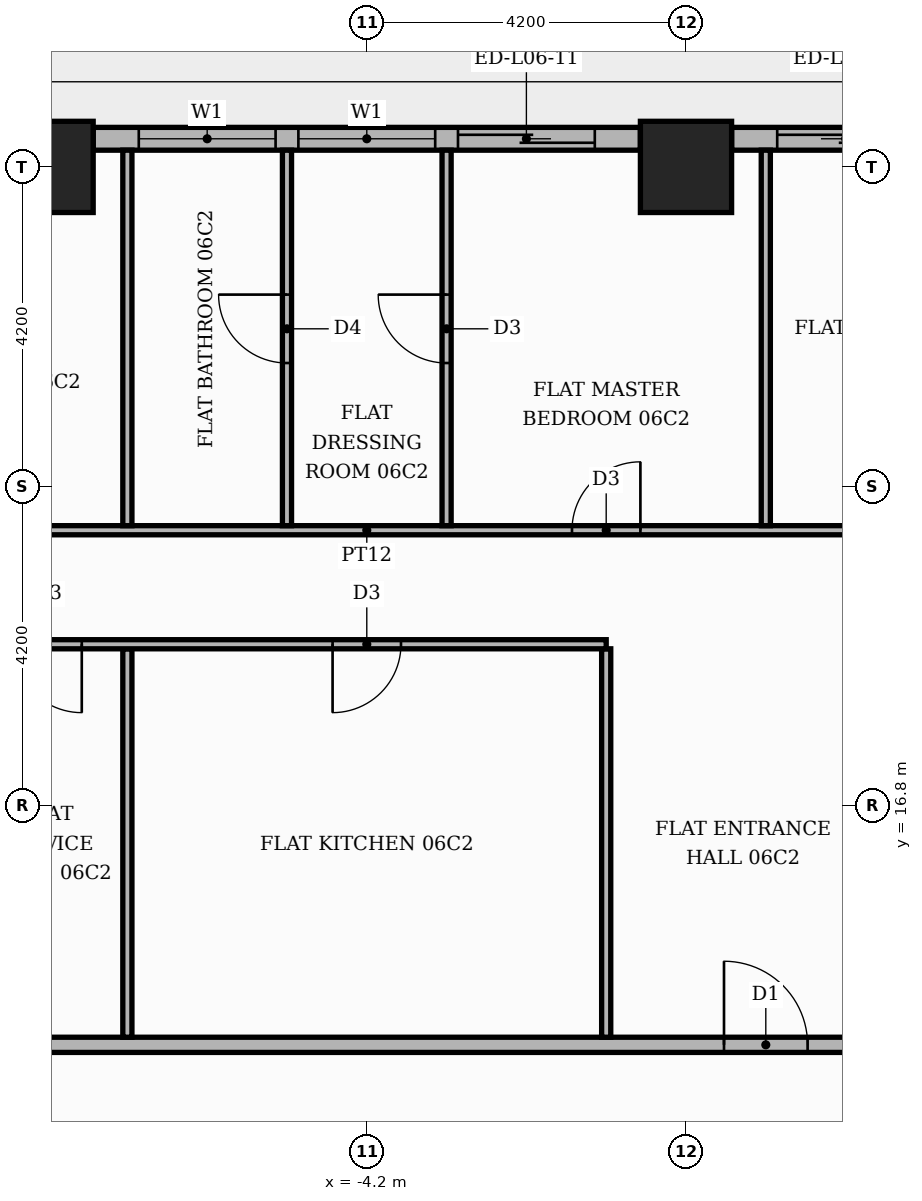
"""IFC4 building model, lengths in metres.
Left out: names, types, materials, properties, quantities, classifications, styles, units other than length and angle.
Written with IfcOpenShell. Run it as: python <this file> out.ifc"""

import sys

from ifc_helpers import new_model, si_unit, direction, frame, frame_2d, origin, origin_2d, place, context, subcontext, project, spatial, rectangle, extrude, element, fill, save


model = new_model("IFC4")
c1 = context("Model", 3, precision=1e-05, world=origin(), true_north=direction((0.0, 1.0)))
c2 = subcontext(c1, "Body", "Model", "MODEL_VIEW")
j1 = project(units=[si_unit("LENGTHUNIT", "METRE"), si_unit("PLANEANGLEUNIT", "RADIAN")], contexts=[c1])
p1 = place(None, origin())
s1 = spatial("IfcSite", under=j1, at=p1, CompositionType="ELEMENT")
p2 = place(p1, origin())
s2 = spatial("IfcBuilding", under=s1, at=p2, CompositionType="ELEMENT")
p3 = place(p2, frame((0.0, 0.0, 30.9)))
s3 = spatial("IfcBuildingStorey", under=s2, at=p3, CompositionType="ELEMENT", Elevation=30.9)
for number, where, z_axis, x_axis in (
    (1, (0.0, 25.2, 0.0), (0.0, 0.0, 1.0), (1.0, 0.0, 0.0)),
    (2, (-8.4, 25.2, 0.0), (0.0, 0.0, 1.0), (1.0, 0.0, 0.0)),
):
    element("IfcColumn", number, at=place(p3, frame(where, z_axis=z_axis, x_axis=x_axis)), inside=s3, PredefinedType="COLUMN", context=c2, shape_type="SweptSolid", body=[
        extrude(rectangle(XDim=1.2, YDim=1.2, at=origin_2d()), origin(), (0.0, 0.0, 1.0), 3.9),
    ])
p4 = place(p3, frame((7.8, 25.57, 0.0), z_axis=(0.0, 0.0, 1.0), x_axis=(-1.0, 0.0, 0.0)))
e3 = element("IfcWall", 3, at=p4, inside=s3, PredefinedType="STANDARD", context=c2, shape_type="SweptSolid", body=[
    extrude(rectangle(XDim=7.2, YDim=0.3, at=frame_2d((3.6, 0.0))), origin(), (0.0, 0.0, 1.0), 3.48),
])
p5 = place(p4, frame((0.6, 0.0, 0.9)))
e4 = element("IfcOpeningElement", 4, at=p5, cuts=e3, PredefinedType="OPENING", context=c2, shape_type="SweptSolid", body=[
    extrude(rectangle(XDim=1.8, YDim=2.1, at=frame_2d((0.9, 1.05))), frame((0.0, 0.16, 0.0), z_axis=(0.0, -1.0, 0.0), x_axis=(1.0, 0.0, 0.0)), (0.0, 0.0, 1.0), 0.32),
])
p6 = place(p4, frame((2.7, 0.0, 0.9)))
e5 = element("IfcOpeningElement", 5, at=p6, cuts=e3, PredefinedType="OPENING", context=c2, shape_type="SweptSolid", body=[
    extrude(rectangle(XDim=1.8, YDim=2.1, at=frame_2d((0.9, 1.05))), frame((0.0, 0.16, 0.0), z_axis=(0.0, -1.0, 0.0), x_axis=(1.0, 0.0, 0.0)), (0.0, 0.0, 1.0), 0.32),
])
p7 = place(p4, frame((4.8, 0.0, 0.0)))
e6 = element("IfcOpeningElement", 6, at=p7, cuts=e3, PredefinedType="OPENING", context=c2, shape_type="SweptSolid", body=[
    extrude(rectangle(XDim=1.8, YDim=2.4, at=frame_2d((0.9, 1.2))), frame((0.0, 0.16, 0.0), z_axis=(0.0, -1.0, 0.0), x_axis=(1.0, 0.0, 0.0)), (0.0, 0.0, 1.0), 0.32),
])
p8 = place(p3, frame((-0.6, 25.57, 0.0), z_axis=(0.0, 0.0, 1.0), x_axis=(-1.0, 0.0, 0.0)))
e7 = element("IfcWall", 7, at=p8, inside=s3, PredefinedType="STANDARD", context=c2, shape_type="SweptSolid", body=[
    extrude(rectangle(XDim=7.2, YDim=0.3, at=frame_2d((3.6, 0.0))), origin(), (0.0, 0.0, 1.0), 3.48),
])
p9 = place(p8, frame((0.6, 0.0, 0.0)))
e8 = element("IfcOpeningElement", 8, at=p9, cuts=e7, PredefinedType="OPENING", context=c2, shape_type="SweptSolid", body=[
    extrude(rectangle(XDim=1.8, YDim=2.4, at=frame_2d((0.9, 1.2))), frame((0.0, 0.16, 0.0), z_axis=(0.0, -1.0, 0.0), x_axis=(1.0, 0.0, 0.0)), (0.0, 0.0, 1.0), 0.32),
])
p10 = place(p8, frame((2.7, 0.0, 0.9)))
e9 = element("IfcOpeningElement", 9, at=p10, cuts=e7, PredefinedType="OPENING", context=c2, shape_type="SweptSolid", body=[
    extrude(rectangle(XDim=1.8, YDim=2.1, at=frame_2d((0.9, 1.05))), frame((0.0, 0.16, 0.0), z_axis=(0.0, -1.0, 0.0), x_axis=(1.0, 0.0, 0.0)), (0.0, 0.0, 1.0), 0.32),
])
p11 = place(p8, frame((4.8, 0.0, 0.9)))
e10 = element("IfcOpeningElement", 10, at=p11, cuts=e7, PredefinedType="OPENING", context=c2, shape_type="SweptSolid", body=[
    extrude(rectangle(XDim=1.8, YDim=2.1, at=frame_2d((0.9, 1.05))), frame((0.0, 0.16, 0.0), z_axis=(0.0, -1.0, 0.0), x_axis=(1.0, 0.0, 0.0)), (0.0, 0.0, 1.0), 0.32),
])
p12 = place(p3, frame((-13.65, 13.65, 0.0), z_axis=(0.0, 0.0, 1.0), x_axis=(1.0, 0.0, 0.0)))
e11 = element("IfcWall", 11, at=p12, inside=s3, PredefinedType="PARTITIONING", context=c2, shape_type="SweptSolid", body=[
    extrude(rectangle(XDim=39.07, YDim=0.2, at=frame_2d((19.535, 0.0))), origin(), (0.0, 0.0, 1.0), 3.48),
])
p13 = place(p12, frame((24.65, 0.0, 0.0)))
e12 = element("IfcOpeningElement", 12, at=p13, cuts=e11, PredefinedType="OPENING", context=c2, shape_type="SweptSolid", body=[
    extrude(rectangle(XDim=1.1, YDim=2.4, at=frame_2d((0.55, 1.2))), frame((0.0, 0.11, 0.0), z_axis=(0.0, -1.0, 0.0), x_axis=(1.0, 0.0, 0.0)), (0.0, 0.0, 1.0), 0.22),
])
p14 = place(p12, frame((14.15, 0.0, 0.0)))
e13 = element("IfcOpeningElement", 13, at=p14, cuts=e11, PredefinedType="OPENING", context=c2, shape_type="SweptSolid", body=[
    extrude(rectangle(XDim=1.1, YDim=2.4, at=frame_2d((0.55, 1.2))), frame((0.0, 0.11, 0.0), z_axis=(0.0, -1.0, 0.0), x_axis=(1.0, 0.0, 0.0)), (0.0, 0.0, 1.0), 0.22),
])
for number, where, z_axis, x_axis in (
    (14, (-7.35, 13.75, 0.0), (0.0, 0.0, 1.0), (0.0, 1.0, 0.0)),
    (15, (-1.05, 13.75, 0.0), (0.0, 0.0, 1.0), (0.0, 1.0, 0.0)),
):
    element("IfcWall", number, at=place(p3, frame(where, z_axis=z_axis, x_axis=x_axis)), inside=s3, PredefinedType="PARTITIONING", context=c2, shape_type="SweptSolid", body=[
        extrude(rectangle(XDim=5.11, YDim=0.12, at=frame_2d((2.555, 0.0))), origin(), (0.0, 0.0, 1.0), 3.48),
    ])
p15 = place(p3, frame((-13.55, 18.92, 0.0), z_axis=(0.0, 0.0, 1.0), x_axis=(1.0, 0.0, 0.0)))
e16 = element("IfcWall", 16, at=p15, inside=s3, PredefinedType="PARTITIONING", context=c2, shape_type="SweptSolid", body=[
    extrude(rectangle(XDim=12.5, YDim=0.12, at=frame_2d((6.25, 0.0))), origin(), (0.0, 0.0, 1.0), 3.48),
])
p16 = place(p15, frame((8.9, 0.0, 0.0)))
e17 = element("IfcOpeningElement", 17, at=p16, cuts=e16, PredefinedType="OPENING", context=c2, shape_type="SweptSolid", body=[
    extrude(rectangle(XDim=0.9, YDim=2.1, at=frame_2d((0.45, 1.05))), frame((0.0, 0.07, 0.0), z_axis=(0.0, -1.0, 0.0), x_axis=(1.0, 0.0, 0.0)), (0.0, 0.0, 1.0), 0.14),
])
p17 = place(p15, frame((4.7, 0.0, 0.0)))
e18 = element("IfcOpeningElement", 18, at=p17, cuts=e16, PredefinedType="OPENING", context=c2, shape_type="SweptSolid", body=[
    extrude(rectangle(XDim=0.9, YDim=2.1, at=frame_2d((0.45, 1.05))), frame((0.0, 0.07, 0.0), z_axis=(0.0, -1.0, 0.0), x_axis=(1.0, 0.0, 0.0)), (0.0, 0.0, 1.0), 0.14),
])
p18 = place(p15, frame((2.6, 0.0, 0.0)))
e19 = element("IfcOpeningElement", 19, at=p18, cuts=e16, PredefinedType="OPENING", context=c2, shape_type="SweptSolid", body=[
    extrude(rectangle(XDim=0.9, YDim=2.1, at=frame_2d((0.45, 1.05))), frame((0.0, 0.07, 0.0), z_axis=(0.0, -1.0, 0.0), x_axis=(1.0, 0.0, 0.0)), (0.0, 0.0, 1.0), 0.14),
])
p19 = place(p15, frame((0.5, 0.0, 0.0)))
e20 = element("IfcOpeningElement", 20, at=p19, cuts=e16, PredefinedType="OPENING", context=c2, shape_type="SweptSolid", body=[
    extrude(rectangle(XDim=0.9, YDim=2.1, at=frame_2d((0.45, 1.05))), frame((0.0, 0.07, 0.0), z_axis=(0.0, -1.0, 0.0), x_axis=(1.0, 0.0, 0.0)), (0.0, 0.0, 1.0), 0.14),
])
p20 = place(p3, frame((-13.55, 20.42, 0.0), z_axis=(0.0, 0.0, 1.0), x_axis=(1.0, 0.0, 0.0)))
e21 = element("IfcWall", 21, at=p20, inside=s3, PredefinedType="PARTITIONING", context=c2, shape_type="SweptSolid", body=[
    extrude(rectangle(XDim=18.7, YDim=0.12, at=frame_2d((9.35, 0.0))), origin(), (0.0, 0.0, 1.0), 3.48),
])
p21 = place(p20, frame((16.2, 0.0, 0.0)))
e22 = element("IfcOpeningElement", 22, at=p21, cuts=e21, PredefinedType="OPENING", context=c2, shape_type="SweptSolid", body=[
    extrude(rectangle(XDim=1.0, YDim=2.1, at=frame_2d((0.5, 1.05))), frame((0.0, 0.07, 0.0), z_axis=(0.0, -1.0, 0.0), x_axis=(1.0, 0.0, 0.0)), (0.0, 0.0, 1.0), 0.14),
])
p22 = place(p20, frame((12.05, 0.0, 0.0)))
e23 = element("IfcOpeningElement", 23, at=p22, cuts=e21, PredefinedType="OPENING", context=c2, shape_type="SweptSolid", body=[
    extrude(rectangle(XDim=0.9, YDim=2.1, at=frame_2d((0.45, 1.05))), frame((0.0, 0.07, 0.0), z_axis=(0.0, -1.0, 0.0), x_axis=(1.0, 0.0, 0.0)), (0.0, 0.0, 1.0), 0.14),
])
p23 = place(p20, frame((3.65, 0.0, 0.0)))
e24 = element("IfcOpeningElement", 24, at=p23, cuts=e21, PredefinedType="OPENING", context=c2, shape_type="SweptSolid", body=[
    extrude(rectangle(XDim=0.9, YDim=2.1, at=frame_2d((0.45, 1.05))), frame((0.0, 0.07, 0.0), z_axis=(0.0, -1.0, 0.0), x_axis=(1.0, 0.0, 0.0)), (0.0, 0.0, 1.0), 0.14),
])
p24 = place(p3, frame((-7.35, 20.48, 0.0), z_axis=(0.0, 0.0, 1.0), x_axis=(0.0, 1.0, 0.0)))
e25 = element("IfcWall", 25, at=p24, inside=s3, PredefinedType="PARTITIONING", context=c2, shape_type="SweptSolid", body=[
    extrude(rectangle(XDim=4.94, YDim=0.12, at=frame_2d((2.47, 0.0))), origin(), (0.0, 0.0, 1.0), 3.48),
])
p25 = place(p3, frame((-5.25, 20.48, 0.0), z_axis=(0.0, 0.0, 1.0), x_axis=(0.0, 1.0, 0.0)))
e26 = element("IfcWall", 26, at=p25, inside=s3, PredefinedType="PARTITIONING", context=c2, shape_type="SweptSolid", body=[
    extrude(rectangle(XDim=4.94, YDim=0.12, at=frame_2d((2.47, 0.0))), origin(), (0.0, 0.0, 1.0), 3.48),
])
p26 = place(p25, frame((2.14, 0.0, 0.0)))
e27 = element("IfcOpeningElement", 27, at=p26, cuts=e26, PredefinedType="OPENING", context=c2, shape_type="SweptSolid", body=[
    extrude(rectangle(XDim=0.9, YDim=2.1, at=frame_2d((0.45, 1.05))), frame((0.0, 0.07, 0.0), z_axis=(0.0, -1.0, 0.0), x_axis=(1.0, 0.0, 0.0)), (0.0, 0.0, 1.0), 0.14),
])
p27 = place(p3, frame((-3.15, 20.48, 0.0), z_axis=(0.0, 0.0, 1.0), x_axis=(0.0, 1.0, 0.0)))
e28 = element("IfcWall", 28, at=p27, inside=s3, PredefinedType="PARTITIONING", context=c2, shape_type="SweptSolid", body=[
    extrude(rectangle(XDim=4.94, YDim=0.12, at=frame_2d((2.47, 0.0))), origin(), (0.0, 0.0, 1.0), 3.48),
])
p28 = place(p27, frame((2.14, 0.0, 0.0)))
e29 = element("IfcOpeningElement", 29, at=p28, cuts=e28, PredefinedType="OPENING", context=c2, shape_type="SweptSolid", body=[
    extrude(rectangle(XDim=0.9, YDim=2.1, at=frame_2d((0.45, 1.05))), frame((0.0, 0.07, 0.0), z_axis=(0.0, -1.0, 0.0), x_axis=(1.0, 0.0, 0.0)), (0.0, 0.0, 1.0), 0.14),
])
p29 = place(p3, frame((1.05, 20.48, 0.0), z_axis=(0.0, 0.0, 1.0), x_axis=(0.0, 1.0, 0.0)))
e30 = element("IfcWall", 30, at=p29, inside=s3, PredefinedType="PARTITIONING", context=c2, shape_type="SweptSolid", body=[
    extrude(rectangle(XDim=4.94, YDim=0.12, at=frame_2d((2.47, 0.0))), origin(), (0.0, 0.0, 1.0), 3.48),
])
p30 = place(p7, origin())
e31 = element("IfcDoor", 31, at=p30, inside=s3, OperationType="SLIDING_TO_RIGHT", PredefinedType="DOOR", context=c2, shape_type="SweptSolid", body=[
    extrude(rectangle(XDim=1.8, YDim=2.4, at=frame_2d((0.9, 1.2))), frame((0.0, 0.025, 0.0), z_axis=(0.0, -1.0, 0.0), x_axis=(1.0, 0.0, 0.0)), (0.0, 0.0, 1.0), 0.05),
])
fill(e6, e31)
p31 = place(p9, origin())
e32 = element("IfcDoor", 32, at=p31, inside=s3, OperationType="SLIDING_TO_LEFT", PredefinedType="DOOR", context=c2, shape_type="SweptSolid", body=[
    extrude(rectangle(XDim=1.8, YDim=2.4, at=frame_2d((0.9, 1.2))), frame((0.0, 0.025, 0.0), z_axis=(0.0, -1.0, 0.0), x_axis=(1.0, 0.0, 0.0)), (0.0, 0.0, 1.0), 0.05),
])
fill(e8, e32)
p32 = place(p10, origin())
e33 = element("IfcWindow", 33, at=p32, inside=s3, PartitioningType="SINGLE_PANEL", PredefinedType="WINDOW", context=c2, shape_type="SweptSolid", body=[
    extrude(rectangle(XDim=1.8, YDim=2.1, at=frame_2d((0.9, 1.05))), frame((0.0, 0.03, 0.0), z_axis=(0.0, -1.0, 0.0), x_axis=(1.0, 0.0, 0.0)), (0.0, 0.0, 1.0), 0.06),
])
fill(e9, e33)
p33 = place(p11, origin())
e34 = element("IfcWindow", 34, at=p33, inside=s3, PartitioningType="SINGLE_PANEL", PredefinedType="WINDOW", context=c2, shape_type="SweptSolid", body=[
    extrude(rectangle(XDim=1.8, YDim=2.1, at=frame_2d((0.9, 1.05))), frame((0.0, 0.03, 0.0), z_axis=(0.0, -1.0, 0.0), x_axis=(1.0, 0.0, 0.0)), (0.0, 0.0, 1.0), 0.06),
])
fill(e10, e34)
p34 = place(p14, origin())
e35 = element("IfcDoor", 35, at=p34, inside=s3, OperationType="SINGLE_SWING_LEFT", PredefinedType="DOOR", context=c2, shape_type="SweptSolid", body=[
    extrude(rectangle(XDim=1.1, YDim=2.4, at=frame_2d((0.55, 1.2))), frame((0.0, 0.025, 0.0), z_axis=(0.0, -1.0, 0.0), x_axis=(1.0, 0.0, 0.0)), (0.0, 0.0, 1.0), 0.05),
])
fill(e13, e35)
p35 = place(p16, frame((0.9, 0.0, 0.0), z_axis=(0.0, 0.0, 1.0), x_axis=(-1.0, 0.0, 0.0)))
e36 = element("IfcDoor", 36, at=p35, inside=s3, OperationType="SINGLE_SWING_LEFT", PredefinedType="DOOR", context=c2, shape_type="SweptSolid", body=[
    extrude(rectangle(XDim=0.9, YDim=2.1, at=frame_2d((0.45, 1.05))), frame((0.0, 0.025, 0.0), z_axis=(0.0, -1.0, 0.0), x_axis=(1.0, 0.0, 0.0)), (0.0, 0.0, 1.0), 0.05),
])
fill(e17, e36)
p36 = place(p17, frame((0.9, 0.0, 0.0), z_axis=(0.0, 0.0, 1.0), x_axis=(-1.0, 0.0, 0.0)))
e37 = element("IfcDoor", 37, at=p36, inside=s3, OperationType="SINGLE_SWING_RIGHT", PredefinedType="DOOR", context=c2, shape_type="SweptSolid", body=[
    extrude(rectangle(XDim=0.9, YDim=2.1, at=frame_2d((0.45, 1.05))), frame((0.0, 0.025, 0.0), z_axis=(0.0, -1.0, 0.0), x_axis=(1.0, 0.0, 0.0)), (0.0, 0.0, 1.0), 0.05),
])
fill(e18, e37)
p37 = place(p22, origin())
e38 = element("IfcDoor", 38, at=p37, inside=s3, OperationType="SINGLE_SWING_RIGHT", PredefinedType="DOOR", context=c2, shape_type="SweptSolid", body=[
    extrude(rectangle(XDim=0.9, YDim=2.1, at=frame_2d((0.45, 1.05))), frame((0.0, 0.025, 0.0), z_axis=(0.0, -1.0, 0.0), x_axis=(1.0, 0.0, 0.0)), (0.0, 0.0, 1.0), 0.05),
])
fill(e23, e38)
p38 = place(p28, origin())
e39 = element("IfcDoor", 39, at=p38, inside=s3, OperationType="SINGLE_SWING_RIGHT", PredefinedType="DOOR", context=c2, shape_type="SweptSolid", body=[
    extrude(rectangle(XDim=0.9, YDim=2.1, at=frame_2d((0.45, 1.05))), frame((0.0, 0.025, 0.0), z_axis=(0.0, -1.0, 0.0), x_axis=(1.0, 0.0, 0.0)), (0.0, 0.0, 1.0), 0.05),
])
fill(e29, e39)
p39 = place(p26, origin())
e40 = element("IfcDoor", 40, at=p39, inside=s3, OperationType="SINGLE_SWING_RIGHT", PredefinedType="DOOR", context=c2, shape_type="SweptSolid", body=[
    extrude(rectangle(XDim=0.9, YDim=2.1, at=frame_2d((0.45, 1.05))), frame((0.0, 0.025, 0.0), z_axis=(0.0, -1.0, 0.0), x_axis=(1.0, 0.0, 0.0)), (0.0, 0.0, 1.0), 0.05),
])
fill(e27, e40)
save(model, sys.argv[1])
